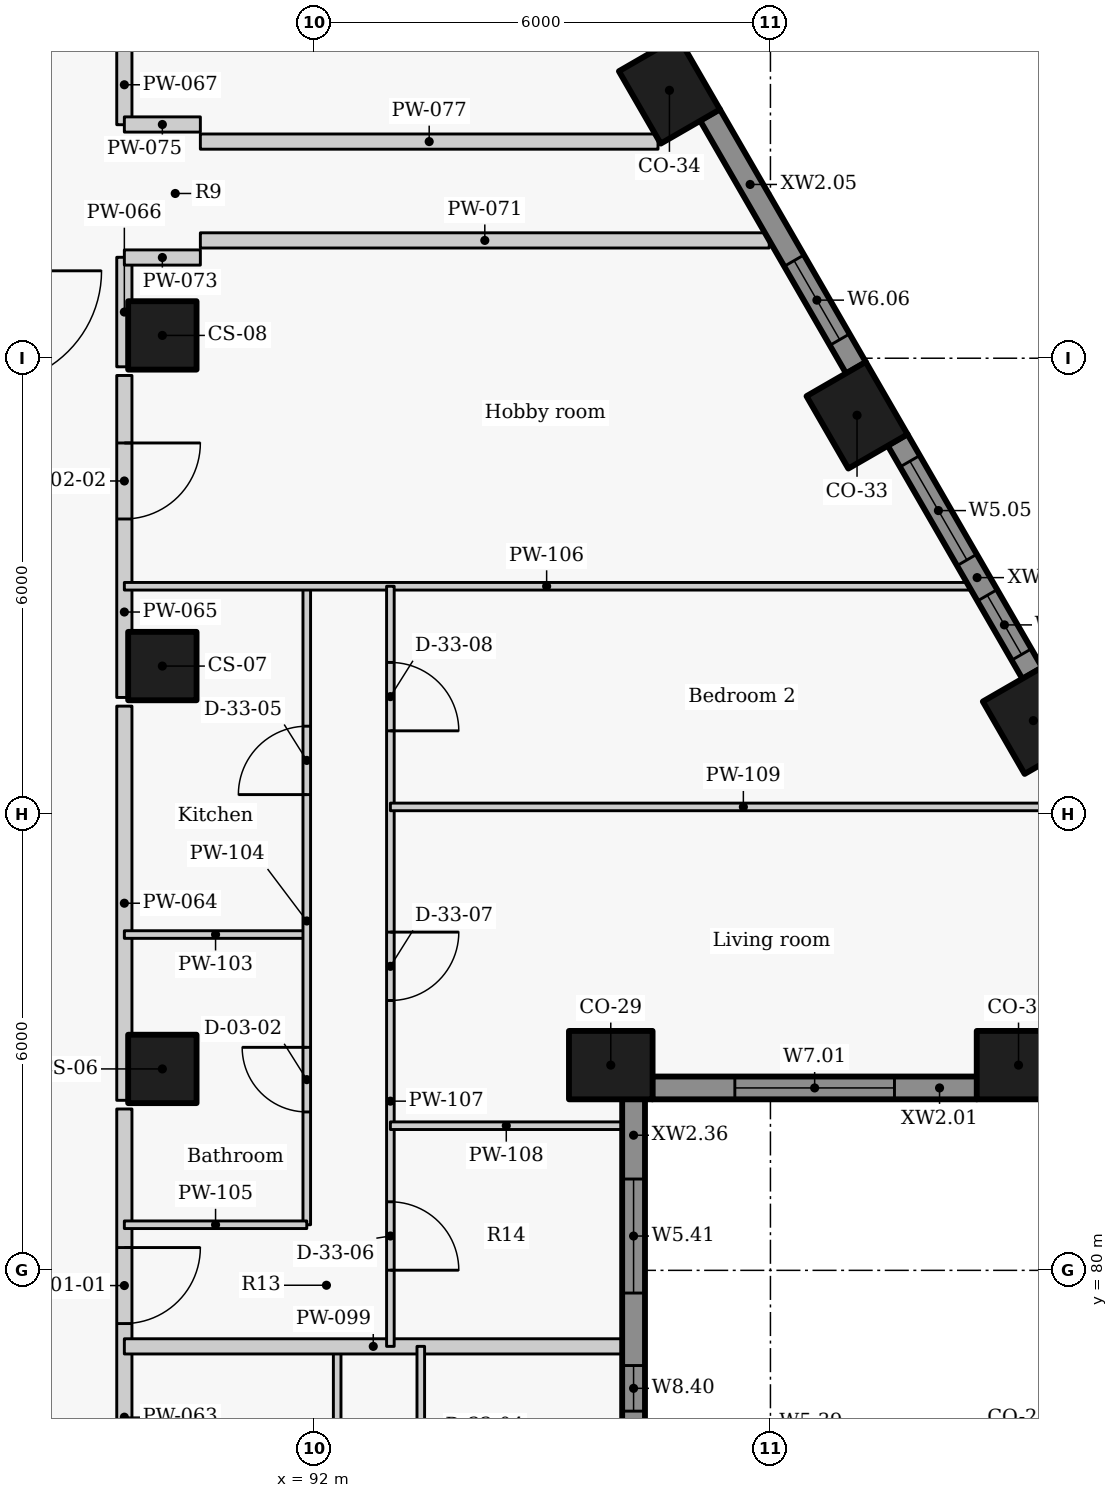
"""IFC4 building model, lengths in metres.
Left out: names, types, materials, properties, quantities, classifications, styles, units other than length and angle.
Written with IfcOpenShell. Run it as: python <this file> out.ifc"""

import sys

from ifc_helpers import new_model, si_unit, direction, frame, frame_2d, origin, origin_2d, place, context, subcontext, project, spatial, rectangle, extrude, element, fill, save


model = new_model("IFC4")
c1 = context("Model", 3, precision=1e-05, world=origin(), true_north=direction((0.0, 1.0)))
c2 = subcontext(c1, "Body", "Model", "MODEL_VIEW")
j1 = project(units=[si_unit("LENGTHUNIT", "METRE"), si_unit("PLANEANGLEUNIT", "RADIAN")], contexts=[c1])
p1 = place(None, origin())
s1 = spatial("IfcSite", under=j1, at=p1, CompositionType="ELEMENT")
p2 = place(p1, origin())
s2 = spatial("IfcBuilding", under=s1, at=p2, CompositionType="ELEMENT")
p3 = place(p2, frame((0.0, 0.0, 269.1)))
s3 = spatial("IfcBuildingStorey", under=s2, at=p3, CompositionType="ELEMENT", Elevation=269.1)
for number, where, z_axis, x_axis in (
    (1, (95.899, 82.7, 0.0), (0.0, 0.0, 1.0), (1.0, 0.0, 0.0)),
    (2, (101.264, 82.7, 0.0), (0.0, 0.0, 1.0), (1.0, 0.0, 0.0)),
    (3, (101.459, 87.232, 0.0), (0.0, 0.0, 1.0), (-0.5, 0.866, 0.0)),
    (4, (99.139, 91.25, 0.0), (0.0, 0.0, 1.0), (-0.5, 0.866, 0.0)),
    (5, (96.671, 95.525, 0.0), (0.0, 0.0, 1.0), (-0.5, 0.866, 0.0)),
):
    element("IfcColumn", number, at=place(p3, frame(where, z_axis=z_axis, x_axis=x_axis)), inside=s3, PredefinedType="COLUMN", context=c2, shape_type="SweptSolid", body=[
        extrude(rectangle(XDim=1.1, YDim=0.9, at=origin_2d()), origin(), (0.0, 0.0, 1.0), 3.3),
    ])
for number, where, z_axis, x_axis in (
    (6, (90.0, 82.65, 0.0), (0.0, 0.0, 1.0), (0.0, 1.0, 0.0)),
    (7, (90.0, 87.95, 0.0), (0.0, 0.0, 1.0), (0.0, 1.0, 0.0)),
    (8, (90.0, 92.3, 0.0), (0.0, 0.0, 1.0), (0.0, 1.0, 0.0)),
):
    element("IfcColumn", number, at=place(p3, frame(where, z_axis=z_axis, x_axis=x_axis)), inside=s3, PredefinedType="COLUMN", context=c2, shape_type="SweptSolid", body=[
        extrude(rectangle(XDim=0.9, YDim=0.9, at=origin_2d()), origin(), (0.0, 0.0, 1.0), 3.3),
    ])
p4 = place(p3, frame((96.446, 82.4, 0.0), z_axis=(0.0, 0.0, 1.0), x_axis=(1.0, 0.0, 0.0)))
e9 = element("IfcWall", 9, at=p4, inside=s3, PredefinedType="SOLIDWALL", context=c2, shape_type="SweptSolid", body=[
    extrude(rectangle(XDim=4.272, YDim=0.3, at=frame_2d((2.136, 0.0))), origin(), (0.0, 0.0, 1.0), 2.125),
])
p5 = place(p4, frame((1.086, 0.0, 0.9)))
e10 = element("IfcOpeningElement", 10, at=p5, cuts=e9, PredefinedType="OPENING", context=c2, shape_type="SweptSolid", body=[
    extrude(rectangle(XDim=2.1, YDim=1.1, at=frame_2d((1.05, 0.55))), frame((0.0, 0.16, 0.0), z_axis=(0.0, -1.0, 0.0), x_axis=(1.0, 0.0, 0.0)), (0.0, 0.0, 1.0), 0.32),
])
p6 = place(p3, frame((101.446, 87.855, 0.0), z_axis=(0.0, 0.0, 1.0), x_axis=(-0.500010404316, 0.866019396766, 0.0)))
e11 = element("IfcWall", 11, at=p6, inside=s3, PredefinedType="SOLIDWALL", context=c2, shape_type="SweptSolid", body=[
    extrude(rectangle(XDim=3.547, YDim=0.3, at=frame_2d((1.774, 0.0))), origin(), (0.0, 0.0, 1.0), 2.125),
])
p7 = place(p6, frame((0.285, 0.0, 0.9)))
e12 = element("IfcOpeningElement", 12, at=p7, cuts=e11, PredefinedType="OPENING", context=c2, shape_type="SweptSolid", body=[
    extrude(rectangle(XDim=0.9, YDim=1.1, at=frame_2d((0.45, 0.55))), frame((0.0, 0.16, 0.0), z_axis=(0.0, -1.0, 0.0), x_axis=(1.0, 0.0, 0.0)), (0.0, 0.0, 1.0), 0.32),
])
p8 = place(p6, frame((1.722, 0.0, 0.9)))
e13 = element("IfcOpeningElement", 13, at=p8, cuts=e11, PredefinedType="OPENING", context=c2, shape_type="SweptSolid", body=[
    extrude(rectangle(XDim=1.5, YDim=1.1, at=frame_2d((0.75, 0.55))), frame((0.0, 0.16, 0.0), z_axis=(0.0, -1.0, 0.0), x_axis=(1.0, 0.0, 0.0)), (0.0, 0.0, 1.0), 0.32),
])
p9 = place(p3, frame((99.126, 91.873, 0.0), z_axis=(0.0, 0.0, 1.0), x_axis=(-0.499984490703, 0.866034357896, 0.0)))
e14 = element("IfcWall", 14, at=p9, inside=s3, PredefinedType="SOLIDWALL", context=c2, shape_type="SweptSolid", body=[
    extrude(rectangle(XDim=3.844, YDim=0.3, at=frame_2d((1.922, 0.0))), origin(), (0.0, 0.0, 1.0), 2.125),
])
p10 = place(p9, frame((0.43, 0.0, 0.9)))
e15 = element("IfcOpeningElement", 15, at=p10, cuts=e14, PredefinedType="OPENING", context=c2, shape_type="SweptSolid", body=[
    extrude(rectangle(XDim=1.2, YDim=1.1, at=frame_2d((0.6, 0.55))), frame((0.0, 0.16, 0.0), z_axis=(0.0, -1.0, 0.0), x_axis=(1.0, 0.0, 0.0)), (0.0, 0.0, 1.0), 0.32),
])
p11 = place(p3, frame((96.199, 77.846, 0.0), z_axis=(0.0, 0.0, 1.0), x_axis=(0.0, 1.0, 0.0)))
e16 = element("IfcWall", 16, at=p11, inside=s3, PredefinedType="SOLIDWALL", context=c2, shape_type="SweptSolid", body=[
    extrude(rectangle(XDim=4.408, YDim=0.3, at=frame_2d((2.204, 0.0))), origin(), (0.0, 0.0, 1.0), 2.125),
])
p12 = place(p11, frame((0.302, 0.0, 0.9)))
e17 = element("IfcOpeningElement", 17, at=p12, cuts=e16, PredefinedType="OPENING", context=c2, shape_type="SweptSolid", body=[
    extrude(rectangle(XDim=0.6, YDim=1.1, at=frame_2d((0.3, 0.55))), frame((0.0, 0.16, 0.0), z_axis=(0.0, -1.0, 0.0), x_axis=(1.0, 0.0, 0.0)), (0.0, 0.0, 1.0), 0.32),
])
p13 = place(p11, frame((1.856, 0.0, 0.9)))
e18 = element("IfcOpeningElement", 18, at=p13, cuts=e16, PredefinedType="OPENING", context=c2, shape_type="SweptSolid", body=[
    extrude(rectangle(XDim=1.5, YDim=1.1, at=frame_2d((0.75, 0.55))), frame((0.0, 0.16, 0.0), z_axis=(0.0, -1.0, 0.0), x_axis=(1.0, 0.0, 0.0)), (0.0, 0.0, 1.0), 0.32),
])
p14 = place(p3, frame((89.5, 82.123, 0.0), z_axis=(0.0, 0.0, 1.0), x_axis=(0.0, -1.0, 0.0)))
e19 = element("IfcWall", 19, at=p14, inside=s3, PredefinedType="PARTITIONING", context=c2, shape_type="SweptSolid", body=[
    extrude(rectangle(XDim=5.186, YDim=0.2, at=frame_2d((2.593, 0.0))), origin(), (0.0, 0.0, 1.0), 3.025),
])
p15 = place(p14, frame((1.823, 0.0, 0.0)))
e20 = element("IfcOpeningElement", 20, at=p15, cuts=e19, PredefinedType="OPENING", context=c2, shape_type="SweptSolid", body=[
    extrude(rectangle(XDim=1.0, YDim=2.1, at=frame_2d((0.5, 1.05))), frame((0.0, 0.11, 0.0), z_axis=(0.0, -1.0, 0.0), x_axis=(1.0, 0.0, 0.0)), (0.0, 0.0, 1.0), 0.22),
])
p16 = place(p3, frame((89.5, 82.237, 0.0), z_axis=(0.0, 0.0, 1.0), x_axis=(0.0, 1.0, 0.0)))
e21 = element("IfcWall", 21, at=p16, inside=s3, PredefinedType="PARTITIONING", context=c2, shape_type="SweptSolid", body=[
    extrude(rectangle(XDim=5.186, YDim=0.2, at=frame_2d((2.593, 0.0))), origin(), (0.0, 0.0, 1.0), 3.025),
])
p17 = place(p3, frame((89.5, 91.773, 0.0), z_axis=(0.0, 0.0, 1.0), x_axis=(0.0, -1.0, 0.0)))
e22 = element("IfcWall", 22, at=p17, inside=s3, PredefinedType="PARTITIONING", context=c2, shape_type="SweptSolid", body=[
    extrude(rectangle(XDim=4.236, YDim=0.2, at=frame_2d((2.118, 0.0))), origin(), (0.0, 0.0, 1.0), 3.025),
])
p18 = place(p17, frame((0.888, 0.0, 0.0)))
e23 = element("IfcOpeningElement", 23, at=p18, cuts=e22, PredefinedType="OPENING", context=c2, shape_type="SweptSolid", body=[
    extrude(rectangle(XDim=1.0, YDim=2.1, at=frame_2d((0.5, 1.05))), frame((0.0, 0.11, 0.0), z_axis=(0.0, -1.0, 0.0), x_axis=(1.0, 0.0, 0.0)), (0.0, 0.0, 1.0), 0.22),
])
p19 = place(p3, frame((89.5, 91.887, 0.0), z_axis=(0.0, 0.0, 1.0), x_axis=(0.0, 1.0, 0.0)))
e24 = element("IfcWall", 24, at=p19, inside=s3, PredefinedType="PARTITIONING", context=c2, shape_type="SweptSolid", body=[
    extrude(rectangle(XDim=1.441, YDim=0.2, at=frame_2d((0.72, 0.0))), origin(), (0.0, 0.0, 1.0), 3.025),
])
p20 = place(p3, frame((89.5, 95.072, 0.0), z_axis=(0.0, 0.0, 1.0), x_axis=(0.0, 1.0, 0.0)))
e25 = element("IfcWall", 25, at=p20, inside=s3, PredefinedType="PARTITIONING", context=c2, shape_type="SweptSolid", body=[
    extrude(rectangle(XDim=1.051, YDim=0.2, at=frame_2d((0.525, 0.0))), origin(), (0.0, 0.0, 1.0), 3.025),
])
p21 = place(p3, frame((90.5, 93.55, 0.0), z_axis=(0.0, 0.0, 1.0), x_axis=(1.0, 0.0, 0.0)))
e26 = element("IfcWall", 26, at=p21, inside=s3, PredefinedType="PARTITIONING", context=c2, shape_type="SweptSolid", body=[
    extrude(rectangle(XDim=7.485, YDim=0.2, at=frame_2d((3.742, 0.0))), origin(), (0.0, 0.0, 1.0), 2.105),
])
for number, where, z_axis, x_axis in (
    (27, (89.5, 93.325, 0.0), (0.0, 0.0, 1.0), (1.0, 0.0, 0.0)),
    (28, (89.5, 95.075, 0.0), (0.0, 0.0, 1.0), (1.0, 0.0, 0.0)),
):
    element("IfcWall", number, at=place(p3, frame(where, z_axis=z_axis, x_axis=x_axis)), inside=s3, PredefinedType="PARTITIONING", context=c2, shape_type="SweptSolid", body=[
        extrude(rectangle(XDim=1.0, YDim=0.2, at=frame_2d((0.5, 0.0))), origin(), (0.0, 0.0, 1.0), 2.505),
    ])
p22 = place(p3, frame((90.5, 94.85, 0.0), z_axis=(0.0, 0.0, 1.0), x_axis=(1.0, 0.0, 0.0)))
e29 = element("IfcWall", 29, at=p22, inside=s3, PredefinedType="PARTITIONING", context=c2, shape_type="SweptSolid", body=[
    extrude(rectangle(XDim=6.021, YDim=0.2, at=frame_2d((3.01, 0.0))), origin(), (0.0, 0.0, 1.0), 3.025),
])
p23 = place(p3, frame((92.3, 69.75, 0.0), z_axis=(0.0, 0.0, 1.0), x_axis=(0.0, 1.0, 0.0)))
e30 = element("IfcWall", 30, at=p23, inside=s3, PredefinedType="PARTITIONING", context=c2, shape_type="SweptSolid", body=[
    extrude(rectangle(XDim=9.25, YDim=0.1, at=frame_2d((4.625, 0.0))), origin(), (0.0, 0.0, 1.0), 3.025),
])
p24 = place(p23, frame((1.677, 0.0, 0.0)))
e31 = element("IfcOpeningElement", 31, at=p24, cuts=e30, PredefinedType="OPENING", context=c2, shape_type="SweptSolid", body=[
    extrude(rectangle(XDim=0.85, YDim=2.1, at=frame_2d((0.425, 1.05))), frame((0.0, 0.06, 0.0), z_axis=(0.0, -1.0, 0.0), x_axis=(1.0, 0.0, 0.0)), (0.0, 0.0, 1.0), 0.12),
])
p25 = place(p23, frame((6.277, 0.0, 0.0)))
e32 = element("IfcOpeningElement", 32, at=p25, cuts=e30, PredefinedType="OPENING", context=c2, shape_type="SweptSolid", body=[
    extrude(rectangle(XDim=0.9, YDim=2.1, at=frame_2d((0.45, 1.05))), frame((0.0, 0.06, 0.0), z_axis=(0.0, -1.0, 0.0), x_axis=(1.0, 0.0, 0.0)), (0.0, 0.0, 1.0), 0.12),
])
p26 = place(p3, frame((89.5, 79.0, 0.0), z_axis=(0.0, 0.0, 1.0), x_axis=(1.0, 0.0, 0.0)))
e33 = element("IfcWall", 33, at=p26, inside=s3, PredefinedType="PARTITIONING", context=c2, shape_type="SweptSolid", body=[
    extrude(rectangle(XDim=6.55, YDim=0.2, at=frame_2d((3.275, 0.0))), origin(), (0.0, 0.0, 1.0), 2.105),
])
p27 = place(p3, frame((93.4, 79.0, 0.0), z_axis=(0.0, 0.0, 1.0), x_axis=(0.0, -1.0, 0.0)))
e34 = element("IfcWall", 34, at=p27, inside=s3, PredefinedType="PARTITIONING", context=c2, shape_type="SweptSolid", body=[
    extrude(rectangle(XDim=11.85, YDim=0.1, at=frame_2d((5.925, 0.0))), origin(), (0.0, 0.0, 1.0), 3.025),
])
p28 = place(p27, frame((9.68, 0.0, 0.0)))
e35 = element("IfcOpeningElement", 35, at=p28, cuts=e34, PredefinedType="OPENING", context=c2, shape_type="SweptSolid", body=[
    extrude(rectangle(XDim=0.9, YDim=2.1, at=frame_2d((0.45, 1.05))), frame((0.0, 0.06, 0.0), z_axis=(0.0, -1.0, 0.0), x_axis=(1.0, 0.0, 0.0)), (0.0, 0.0, 1.0), 0.12),
])
p29 = place(p27, frame((5.475, 0.0, 0.0)))
e36 = element("IfcOpeningElement", 36, at=p29, cuts=e34, PredefinedType="OPENING", context=c2, shape_type="SweptSolid", body=[
    extrude(rectangle(XDim=0.9, YDim=2.1, at=frame_2d((0.45, 1.05))), frame((0.0, 0.06, 0.0), z_axis=(0.0, -1.0, 0.0), x_axis=(1.0, 0.0, 0.0)), (0.0, 0.0, 1.0), 0.12),
])
p30 = place(p27, frame((1.27, 0.0, 0.0)))
e37 = element("IfcOpeningElement", 37, at=p30, cuts=e34, PredefinedType="OPENING", context=c2, shape_type="SweptSolid", body=[
    extrude(rectangle(XDim=0.9, YDim=2.1, at=frame_2d((0.45, 1.05))), frame((0.0, 0.06, 0.0), z_axis=(0.0, -1.0, 0.0), x_axis=(1.0, 0.0, 0.0)), (0.0, 0.0, 1.0), 0.12),
])
p31 = place(p3, frame((89.5, 84.418, 0.0), z_axis=(0.0, 0.0, 1.0), x_axis=(1.0, 0.0, 0.0)))
e38 = element("IfcWall", 38, at=p31, inside=s3, PredefinedType="PARTITIONING", context=c2, shape_type="SweptSolid", body=[
    extrude(rectangle(XDim=2.4, YDim=0.1, at=frame_2d((1.2, 0.0))), origin(), (0.0, 0.0, 1.0), 2.505),
])
p32 = place(p3, frame((91.9, 80.6, 0.0), z_axis=(0.0, 0.0, 1.0), x_axis=(0.0, 1.0, 0.0)))
e39 = element("IfcWall", 39, at=p32, inside=s3, PredefinedType="PARTITIONING", context=c2, shape_type="SweptSolid", body=[
    extrude(rectangle(XDim=8.4, YDim=0.1, at=frame_2d((4.2, 0.0))), origin(), (0.0, 0.0, 1.0), 3.025),
])
p33 = place(p32, frame((1.484, 0.0, 0.0)))
e40 = element("IfcOpeningElement", 40, at=p33, cuts=e39, PredefinedType="OPENING", context=c2, shape_type="SweptSolid", body=[
    extrude(rectangle(XDim=0.85, YDim=2.1, at=frame_2d((0.425, 1.05))), frame((0.0, 0.06, 0.0), z_axis=(0.0, -1.0, 0.0), x_axis=(1.0, 0.0, 0.0)), (0.0, 0.0, 1.0), 0.12),
])
p34 = place(p32, frame((5.659, 0.0, 0.0)))
e41 = element("IfcOpeningElement", 41, at=p34, cuts=e39, PredefinedType="OPENING", context=c2, shape_type="SweptSolid", body=[
    extrude(rectangle(XDim=0.9, YDim=2.1, at=frame_2d((0.45, 1.05))), frame((0.0, 0.06, 0.0), z_axis=(0.0, -1.0, 0.0), x_axis=(1.0, 0.0, 0.0)), (0.0, 0.0, 1.0), 0.12),
])
p35 = place(p3, frame((89.5, 80.6, 0.0), z_axis=(0.0, 0.0, 1.0), x_axis=(1.0, 0.0, 0.0)))
e42 = element("IfcWall", 42, at=p35, inside=s3, PredefinedType="PARTITIONING", context=c2, shape_type="SweptSolid", body=[
    extrude(rectangle(XDim=2.4, YDim=0.1, at=frame_2d((1.2, 0.0))), origin(), (0.0, 0.0, 1.0), 2.505),
])
p36 = place(p3, frame((89.5, 89.0, 0.0), z_axis=(0.0, 0.0, 1.0), x_axis=(1.0, 0.0, 0.0)))
e43 = element("IfcWall", 43, at=p36, inside=s3, PredefinedType="PARTITIONING", context=c2, shape_type="SweptSolid", body=[
    extrude(rectangle(XDim=11.111, YDim=0.1, at=frame_2d((5.556, 0.0))), origin(), (0.0, 0.0, 1.0), 2.105),
])
p37 = place(p3, frame((93.0, 89.0, 0.0), z_axis=(0.0, 0.0, 1.0), x_axis=(0.0, -1.0, 0.0)))
e44 = element("IfcWall", 44, at=p37, inside=s3, PredefinedType="PARTITIONING", context=c2, shape_type="SweptSolid", body=[
    extrude(rectangle(XDim=10.0, YDim=0.1, at=frame_2d((5.0, 0.0))), origin(), (0.0, 0.0, 1.0), 3.025),
])
p38 = place(p37, frame((8.098, 0.0, 0.0)))
e45 = element("IfcOpeningElement", 45, at=p38, cuts=e44, PredefinedType="OPENING", context=c2, shape_type="SweptSolid", body=[
    extrude(rectangle(XDim=0.9, YDim=2.1, at=frame_2d((0.45, 1.05))), frame((0.0, 0.06, 0.0), z_axis=(0.0, -1.0, 0.0), x_axis=(1.0, 0.0, 0.0)), (0.0, 0.0, 1.0), 0.12),
])
p39 = place(p37, frame((4.55, 0.0, 0.0)))
e46 = element("IfcOpeningElement", 46, at=p39, cuts=e44, PredefinedType="OPENING", context=c2, shape_type="SweptSolid", body=[
    extrude(rectangle(XDim=0.9, YDim=2.1, at=frame_2d((0.45, 1.05))), frame((0.0, 0.06, 0.0), z_axis=(0.0, -1.0, 0.0), x_axis=(1.0, 0.0, 0.0)), (0.0, 0.0, 1.0), 0.12),
])
p40 = place(p37, frame((1.002, 0.0, 0.0)))
e47 = element("IfcOpeningElement", 47, at=p40, cuts=e44, PredefinedType="OPENING", context=c2, shape_type="SweptSolid", body=[
    extrude(rectangle(XDim=0.9, YDim=2.1, at=frame_2d((0.45, 1.05))), frame((0.0, 0.06, 0.0), z_axis=(0.0, -1.0, 0.0), x_axis=(1.0, 0.0, 0.0)), (0.0, 0.0, 1.0), 0.12),
])
p41 = place(p3, frame((93.0, 81.903, 0.0), z_axis=(0.0, 0.0, 1.0), x_axis=(1.0, 0.0, 0.0)))
e48 = element("IfcWall", 48, at=p41, inside=s3, PredefinedType="PARTITIONING", context=c2, shape_type="SweptSolid", body=[
    extrude(rectangle(XDim=3.05, YDim=0.1, at=frame_2d((1.525, 0.0))), origin(), (0.0, 0.0, 1.0), 2.105),
])
p42 = place(p3, frame((93.0, 86.097, 0.0), z_axis=(0.0, 0.0, 1.0), x_axis=(1.0, 0.0, 0.0)))
e49 = element("IfcWall", 49, at=p42, inside=s3, PredefinedType="PARTITIONING", context=c2, shape_type="SweptSolid", body=[
    extrude(rectangle(XDim=9.288, YDim=0.1, at=frame_2d((4.644, 0.0))), origin(), (0.0, 0.0, 1.0), 2.105),
])
p43 = place(p5, origin())
e50 = element("IfcWindow", 50, at=p43, inside=s3, PartitioningType="SINGLE_PANEL", PredefinedType="WINDOW", context=c2, shape_type="SweptSolid", body=[
    extrude(rectangle(XDim=2.1, YDim=1.1, at=frame_2d((1.05, 0.55))), frame((0.0, 0.03, 0.0), z_axis=(0.0, -1.0, 0.0), x_axis=(1.0, 0.0, 0.0)), (0.0, 0.0, 1.0), 0.06),
])
fill(e10, e50)
p44 = place(p7, origin())
e51 = element("IfcWindow", 51, at=p44, inside=s3, PartitioningType="SINGLE_PANEL", PredefinedType="WINDOW", context=c2, shape_type="SweptSolid", body=[
    extrude(rectangle(XDim=0.9, YDim=1.1, at=frame_2d((0.45, 0.55))), frame((0.0, 0.03, 0.0), z_axis=(0.0, -1.0, 0.0), x_axis=(1.0, 0.0, 0.0)), (0.0, 0.0, 1.0), 0.06),
])
fill(e12, e51)
p45 = place(p8, origin())
e52 = element("IfcWindow", 52, at=p45, inside=s3, PartitioningType="SINGLE_PANEL", PredefinedType="WINDOW", context=c2, shape_type="SweptSolid", body=[
    extrude(rectangle(XDim=1.5, YDim=1.1, at=frame_2d((0.75, 0.55))), frame((0.0, 0.03, 0.0), z_axis=(0.0, -1.0, 0.0), x_axis=(1.0, 0.0, 0.0)), (0.0, 0.0, 1.0), 0.06),
])
fill(e13, e52)
p46 = place(p10, origin())
e53 = element("IfcWindow", 53, at=p46, inside=s3, PartitioningType="SINGLE_PANEL", PredefinedType="WINDOW", context=c2, shape_type="SweptSolid", body=[
    extrude(rectangle(XDim=1.2, YDim=1.1, at=frame_2d((0.6, 0.55))), frame((0.0, 0.03, 0.0), z_axis=(0.0, -1.0, 0.0), x_axis=(1.0, 0.0, 0.0)), (0.0, 0.0, 1.0), 0.06),
])
fill(e15, e53)
p47 = place(p12, origin())
e54 = element("IfcWindow", 54, at=p47, inside=s3, PartitioningType="SINGLE_PANEL", PredefinedType="WINDOW", context=c2, shape_type="SweptSolid", body=[
    extrude(rectangle(XDim=0.6, YDim=1.1, at=frame_2d((0.3, 0.55))), frame((0.0, 0.03, 0.0), z_axis=(0.0, -1.0, 0.0), x_axis=(1.0, 0.0, 0.0)), (0.0, 0.0, 1.0), 0.06),
])
fill(e17, e54)
p48 = place(p13, origin())
e55 = element("IfcWindow", 55, at=p48, inside=s3, PartitioningType="SINGLE_PANEL", PredefinedType="WINDOW", context=c2, shape_type="SweptSolid", body=[
    extrude(rectangle(XDim=1.5, YDim=1.1, at=frame_2d((0.75, 0.55))), frame((0.0, 0.03, 0.0), z_axis=(0.0, -1.0, 0.0), x_axis=(1.0, 0.0, 0.0)), (0.0, 0.0, 1.0), 0.06),
])
fill(e18, e55)
p49 = place(p15, origin())
e56 = element("IfcDoor", 56, at=p49, inside=s3, OperationType="SINGLE_SWING_LEFT", PredefinedType="DOOR", context=c2, shape_type="SweptSolid", body=[
    extrude(rectangle(XDim=1.0, YDim=2.1, at=frame_2d((0.5, 1.05))), frame((0.0, 0.025, 0.0), z_axis=(0.0, -1.0, 0.0), x_axis=(1.0, 0.0, 0.0)), (0.0, 0.0, 1.0), 0.05),
])
fill(e20, e56)
p50 = place(p33, origin())
e57 = element("IfcDoor", 57, at=p50, inside=s3, OperationType="SINGLE_SWING_RIGHT", PredefinedType="DOOR", context=c2, shape_type="SweptSolid", body=[
    extrude(rectangle(XDim=0.85, YDim=2.1, at=frame_2d((0.425, 1.05))), frame((0.0, 0.025, 0.0), z_axis=(0.0, -1.0, 0.0), x_axis=(1.0, 0.0, 0.0)), (0.0, 0.0, 1.0), 0.05),
])
fill(e40, e57)
p51 = place(p34, origin())
e58 = element("IfcDoor", 58, at=p51, inside=s3, OperationType="SINGLE_SWING_LEFT", PredefinedType="DOOR", context=c2, shape_type="SweptSolid", body=[
    extrude(rectangle(XDim=0.9, YDim=2.1, at=frame_2d((0.45, 1.05))), frame((0.0, 0.025, 0.0), z_axis=(0.0, -1.0, 0.0), x_axis=(1.0, 0.0, 0.0)), (0.0, 0.0, 1.0), 0.05),
])
fill(e41, e58)
p52 = place(p38, origin())
e59 = element("IfcDoor", 59, at=p52, inside=s3, OperationType="SINGLE_SWING_RIGHT", PredefinedType="DOOR", context=c2, shape_type="SweptSolid", body=[
    extrude(rectangle(XDim=0.9, YDim=2.1, at=frame_2d((0.45, 1.05))), frame((0.0, 0.025, 0.0), z_axis=(0.0, -1.0, 0.0), x_axis=(1.0, 0.0, 0.0)), (0.0, 0.0, 1.0), 0.05),
])
fill(e45, e59)
p53 = place(p39, origin())
e60 = element("IfcDoor", 60, at=p53, inside=s3, OperationType="SINGLE_SWING_LEFT", PredefinedType="DOOR", context=c2, shape_type="SweptSolid", body=[
    extrude(rectangle(XDim=0.9, YDim=2.1, at=frame_2d((0.45, 1.05))), frame((0.0, 0.025, 0.0), z_axis=(0.0, -1.0, 0.0), x_axis=(1.0, 0.0, 0.0)), (0.0, 0.0, 1.0), 0.05),
])
fill(e46, e60)
p54 = place(p40, origin())
e61 = element("IfcDoor", 61, at=p54, inside=s3, OperationType="SINGLE_SWING_RIGHT", PredefinedType="DOOR", context=c2, shape_type="SweptSolid", body=[
    extrude(rectangle(XDim=0.9, YDim=2.1, at=frame_2d((0.45, 1.05))), frame((0.0, 0.025, 0.0), z_axis=(0.0, -1.0, 0.0), x_axis=(1.0, 0.0, 0.0)), (0.0, 0.0, 1.0), 0.05),
])
fill(e47, e61)
p55 = place(p18, origin())
e62 = element("IfcDoor", 62, at=p55, inside=s3, OperationType="SINGLE_SWING_LEFT", PredefinedType="DOOR", context=c2, shape_type="SweptSolid", body=[
    extrude(rectangle(XDim=1.0, YDim=2.1, at=frame_2d((0.5, 1.05))), frame((0.0, 0.025, 0.0), z_axis=(0.0, -1.0, 0.0), x_axis=(1.0, 0.0, 0.0)), (0.0, 0.0, 1.0), 0.05),
])
fill(e23, e62)
save(model, sys.argv[1])
